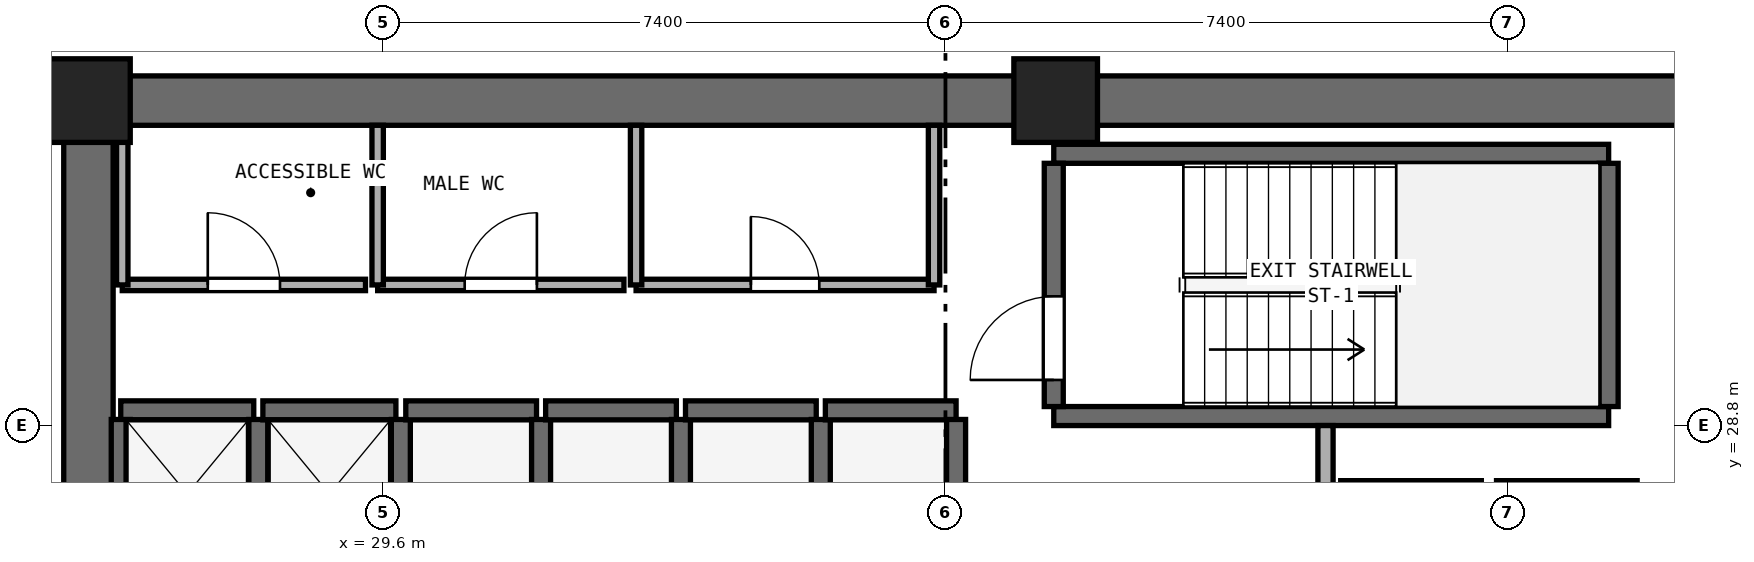
"""IFC4 building model, lengths in metres.
Left out: names, types, materials, properties, quantities, classifications, styles, units other than length and angle.
Written with IfcOpenShell. Run it as: python <this file> out.ifc"""

import sys

from ifc_helpers import new_model, si_unit, direction, frame, frame_2d, origin, origin_2d, place, context, subcontext, project, spatial, rectangle, extrude, element, fill, save


model = new_model("IFC4")
c1 = context("Model", 3, precision=1e-05, world=origin(), true_north=direction((0.0, 1.0)))
c2 = subcontext(c1, "Body", "Model", "MODEL_VIEW")
j1 = project(units=[si_unit("LENGTHUNIT", "METRE"), si_unit("PLANEANGLEUNIT", "RADIAN")], contexts=[c1])
p1 = place(None, origin())
s1 = spatial("IfcSite", under=j1, at=p1, CompositionType="ELEMENT")
p2 = place(p1, origin())
s2 = spatial("IfcBuilding", under=s1, at=p2, CompositionType="ELEMENT")
p3 = place(p2, frame((0.0, 0.0, 82.0)))
s3 = spatial("IfcBuildingStorey", under=s2, at=p3, CompositionType="ELEMENT", Elevation=82.0)
p4 = place(p3, frame((25.4, 33.075, 0.0), z_axis=(0.0, 0.0, 1.0), x_axis=(1.0, 0.0, 0.0)))
e1 = element("IfcWall", 1, at=p4, inside=s3, PredefinedType="SHEAR", context=c2, shape_type="SweptSolid", body=[
    extrude(rectangle(XDim=23.2, YDim=0.65, at=frame_2d((11.6, 0.0))), origin(), (0.0, 0.0, 1.0), 3.525),
])
p5 = place(p3, frame((25.725, 17.65, 0.0), z_axis=(0.0, 0.0, 1.0), x_axis=(0.0, 1.0, 0.0)))
e2 = element("IfcWall", 2, at=p5, inside=s3, PredefinedType="SHEAR", context=c2, shape_type="SweptSolid", body=[
    extrude(rectangle(XDim=15.1, YDim=0.65, at=frame_2d((7.55, 0.0))), origin(), (0.0, 0.0, 1.0), 3.525),
])
p6 = place(p5, frame((6.8, 0.0, 0.0)))
e3 = element("IfcOpeningElement", 3, at=p6, cuts=e2, PredefinedType="OPENING", context=c2, shape_type="SweptSolid", body=[
    extrude(rectangle(XDim=1.5, YDim=2.15, at=frame_2d((0.75, 1.075))), frame((0.0, 0.335, 0.0), z_axis=(0.0, -1.0, 0.0), x_axis=(1.0, 0.0, 0.0)), (0.0, 0.0, 1.0), 0.67),
])
for number, where, z_axis, x_axis in (
    (4, (38.45, 33.075, 0.0), (0.0, 0.0, 1.0), (1.0, 0.0, 0.0)),
    (5, (25.725, 33.075, 0.0), (0.0, 0.0, 1.0), (1.0, 0.0, 0.0)),
):
    element("IfcColumn", number, at=place(p3, frame(where, z_axis=z_axis, x_axis=x_axis)), inside=s3, PredefinedType="PILASTER", context=c2, shape_type="SweptSolid", body=[
        extrude(rectangle(XDim=1.1, YDim=1.1, at=origin_2d()), origin(), (0.0, 0.0, 1.0), 3.8),
    ])
for number, where, z_axis, x_axis in (
    (6, (38.425, 28.925, 0.0), (0.0, 0.0, 1.0), (1.0, 0.0, 0.0)),
    (7, (38.425, 32.375, 0.0), (0.0, 0.0, 1.0), (1.0, 0.0, 0.0)),
):
    element("IfcWall", number, at=place(p3, frame(where, z_axis=z_axis, x_axis=x_axis)), inside=s3, PredefinedType="SHEAR", context=c2, shape_type="SweptSolid", body=[
        extrude(rectangle(XDim=7.3, YDim=0.25, at=frame_2d((3.65, 0.0))), origin(), (0.0, 0.0, 1.0), 3.525),
    ])
p7 = place(p3, frame((38.425, 29.05, 0.0), z_axis=(0.0, 0.0, 1.0), x_axis=(0.0, 1.0, 0.0)))
e8 = element("IfcWall", 8, at=p7, inside=s3, PredefinedType="SHEAR", context=c2, shape_type="SweptSolid", body=[
    extrude(rectangle(XDim=3.2, YDim=0.25, at=frame_2d((1.6, 0.0))), origin(), (0.0, 0.0, 1.0), 3.525),
])
p8 = place(p7, frame((0.35, 0.0, 0.0)))
e9 = element("IfcOpeningElement", 9, at=p8, cuts=e8, PredefinedType="OPENING", context=c2, shape_type="SweptSolid", body=[
    extrude(rectangle(XDim=1.1, YDim=2.15, at=frame_2d((0.55, 1.075))), frame((0.0, 0.135, 0.0), z_axis=(0.0, -1.0, 0.0), x_axis=(1.0, 0.0, 0.0)), (0.0, 0.0, 1.0), 0.27),
])
p9 = place(p3, frame((45.725, 29.05, 0.0), z_axis=(0.0, 0.0, 1.0), x_axis=(0.0, 1.0, 0.0)))
e10 = element("IfcWall", 10, at=p9, inside=s3, PredefinedType="SHEAR", context=c2, shape_type="SweptSolid", body=[
    extrude(rectangle(XDim=3.2, YDim=0.25, at=frame_2d((1.6, 0.0))), origin(), (0.0, 0.0, 1.0), 3.525),
])
p10 = place(p3, frame((26.15, 29.0, 0.0), z_axis=(0.0, 0.0, 1.0), x_axis=(1.0, 0.0, 0.0)))
e11 = element("IfcWall", 11, at=p10, inside=s3, PredefinedType="SHEAR", context=c2, shape_type="SweptSolid", body=[
    extrude(rectangle(XDim=1.75, YDim=0.25, at=frame_2d((0.875, 0.0))), origin(), (0.0, 0.0, 1.0), 3.525),
])
for number, where, z_axis, x_axis in (
    (12, (26.15, 26.92, 0.0), (0.0, 0.0, 1.0), (0.0, 1.0, 0.0)),
    (13, (27.96, 26.92, 0.0), (0.0, 0.0, 1.0), (0.0, 1.0, 0.0)),
):
    element("IfcWall", number, at=place(p3, frame(where, z_axis=z_axis, x_axis=x_axis)), inside=s3, PredefinedType="SHEAR", context=c2, shape_type="SweptSolid", body=[
        extrude(rectangle(XDim=1.96, YDim=0.25, at=frame_2d((0.98, 0.0))), origin(), (0.0, 0.0, 1.0), 3.525),
    ])
p11 = place(p3, frame((28.02, 29.0, 0.0), z_axis=(0.0, 0.0, 1.0), x_axis=(1.0, 0.0, 0.0)))
e14 = element("IfcWall", 14, at=p11, inside=s3, PredefinedType="SHEAR", context=c2, shape_type="SweptSolid", body=[
    extrude(rectangle(XDim=1.75, YDim=0.25, at=frame_2d((0.875, 0.0))), origin(), (0.0, 0.0, 1.0), 3.525),
])
p12 = place(p3, frame((29.835, 26.92, 0.0), z_axis=(0.0, 0.0, 1.0), x_axis=(0.0, 1.0, 0.0)))
e15 = element("IfcWall", 15, at=p12, inside=s3, PredefinedType="SHEAR", context=c2, shape_type="SweptSolid", body=[
    extrude(rectangle(XDim=1.96, YDim=0.25, at=frame_2d((0.98, 0.0))), origin(), (0.0, 0.0, 1.0), 3.525),
])
p13 = place(p3, frame((29.9, 29.0, 0.0), z_axis=(0.0, 0.0, 1.0), x_axis=(1.0, 0.0, 0.0)))
e16 = element("IfcWall", 16, at=p13, inside=s3, PredefinedType="SHEAR", context=c2, shape_type="SweptSolid", body=[
    extrude(rectangle(XDim=1.72, YDim=0.25, at=frame_2d((0.86, 0.0))), origin(), (0.0, 0.0, 1.0), 3.525),
])
p14 = place(p3, frame((31.68, 26.92, 0.0), z_axis=(0.0, 0.0, 1.0), x_axis=(0.0, 1.0, 0.0)))
e17 = element("IfcWall", 17, at=p14, inside=s3, PredefinedType="SHEAR", context=c2, shape_type="SweptSolid", body=[
    extrude(rectangle(XDim=1.96, YDim=0.25, at=frame_2d((0.98, 0.0))), origin(), (0.0, 0.0, 1.0), 3.525),
])
p15 = place(p3, frame((31.74, 29.0, 0.0), z_axis=(0.0, 0.0, 1.0), x_axis=(1.0, 0.0, 0.0)))
e18 = element("IfcWall", 18, at=p15, inside=s3, PredefinedType="SHEAR", context=c2, shape_type="SweptSolid", body=[
    extrude(rectangle(XDim=1.72, YDim=0.25, at=frame_2d((0.86, 0.0))), origin(), (0.0, 0.0, 1.0), 3.525),
])
p16 = place(p3, frame((33.52, 26.92, 0.0), z_axis=(0.0, 0.0, 1.0), x_axis=(0.0, 1.0, 0.0)))
e19 = element("IfcWall", 19, at=p16, inside=s3, PredefinedType="SHEAR", context=c2, shape_type="SweptSolid", body=[
    extrude(rectangle(XDim=1.96, YDim=0.25, at=frame_2d((0.98, 0.0))), origin(), (0.0, 0.0, 1.0), 3.525),
])
p17 = place(p3, frame((33.58, 29.0, 0.0), z_axis=(0.0, 0.0, 1.0), x_axis=(1.0, 0.0, 0.0)))
e20 = element("IfcWall", 20, at=p17, inside=s3, PredefinedType="SHEAR", context=c2, shape_type="SweptSolid", body=[
    extrude(rectangle(XDim=1.72, YDim=0.25, at=frame_2d((0.86, 0.0))), origin(), (0.0, 0.0, 1.0), 3.525),
])
p18 = place(p3, frame((35.36, 26.92, 0.0), z_axis=(0.0, 0.0, 1.0), x_axis=(0.0, 1.0, 0.0)))
e21 = element("IfcWall", 21, at=p18, inside=s3, PredefinedType="SHEAR", context=c2, shape_type="SweptSolid", body=[
    extrude(rectangle(XDim=1.96, YDim=0.25, at=frame_2d((0.98, 0.0))), origin(), (0.0, 0.0, 1.0), 3.525),
])
p19 = place(p3, frame((35.42, 29.0, 0.0), z_axis=(0.0, 0.0, 1.0), x_axis=(1.0, 0.0, 0.0)))
e22 = element("IfcWall", 22, at=p19, inside=s3, PredefinedType="SHEAR", context=c2, shape_type="SweptSolid", body=[
    extrude(rectangle(XDim=1.72, YDim=0.25, at=frame_2d((0.86, 0.0))), origin(), (0.0, 0.0, 1.0), 3.525),
])
p20 = place(p3, frame((37.14, 26.92, 0.0), z_axis=(0.0, 0.0, 1.0), x_axis=(0.0, 1.0, 0.0)))
e23 = element("IfcWall", 23, at=p20, inside=s3, PredefinedType="SHEAR", context=c2, shape_type="SweptSolid", body=[
    extrude(rectangle(XDim=1.96, YDim=0.25, at=frame_2d((0.98, 0.0))), origin(), (0.0, 0.0, 1.0), 3.525),
])
for number, where, z_axis, x_axis in (
    (24, (42.2, 27.95, 0.0), (0.0, 0.0, 1.0), (1.0, 0.0, 0.0)),
    (25, (44.25, 27.95, 0.0), (0.0, 0.0, 1.0), (1.0, 0.0, 0.0)),
):
    element("IfcWall", number, at=place(p3, frame(where, z_axis=z_axis, x_axis=x_axis)), inside=s3, PredefinedType="SHEAR", context=c2, shape_type="SweptSolid", body=[
        extrude(rectangle(XDim=1.85, YDim=0.25, at=frame_2d((0.925, 0.0))), origin(), (0.0, 0.0, 1.0), 3.525),
    ])
p21 = place(p3, frame((42.0, 22.75, 0.0), z_axis=(0.0, 0.0, 1.0), x_axis=(0.0, 1.0, 0.0)))
e26 = element("IfcWall", 26, at=p21, inside=s3, PredefinedType="SOLIDWALL", context=c2, shape_type="SweptSolid", body=[
    extrude(rectangle(XDim=6.05, YDim=0.2, at=frame_2d((3.025, 0.0))), origin(), (0.0, 0.0, 1.0), 3.525),
])
p22 = place(p21, frame((0.65, 0.0, 0.0)))
e27 = element("IfcOpeningElement", 27, at=p22, cuts=e26, PredefinedType="OPENING", context=c2, shape_type="SweptSolid", body=[
    extrude(rectangle(XDim=1.2, YDim=2.15, at=frame_2d((0.6, 1.075))), frame((0.0, 0.11, 0.0), z_axis=(0.0, -1.0, 0.0), x_axis=(1.0, 0.0, 0.0)), (0.0, 0.0, 1.0), 0.22),
])
p23 = place(p3, frame((26.17, 30.65, 0.0), z_axis=(0.0, 0.0, 1.0), x_axis=(1.0, 0.0, 0.0)))
e28 = element("IfcWall", 28, at=p23, inside=s3, PredefinedType="PARTITIONING", context=c2, shape_type="SweptSolid", body=[
    extrude(rectangle(XDim=3.2, YDim=0.15, at=frame_2d((1.6, 0.0))), origin(), (0.0, 0.0, 1.0), 3.525),
])
p24 = place(p23, frame((1.125, 0.0, 0.0)))
e29 = element("IfcOpeningElement", 29, at=p24, cuts=e28, PredefinedType="OPENING", context=c2, shape_type="SweptSolid", body=[
    extrude(rectangle(XDim=0.95, YDim=2.1, at=frame_2d((0.475, 1.05))), frame((0.0, 0.085, 0.0), z_axis=(0.0, -1.0, 0.0), x_axis=(1.0, 0.0, 0.0)), (0.0, 0.0, 1.0), 0.17),
])
p25 = place(p3, frame((26.17, 30.65, 0.0), z_axis=(0.0, 0.0, 1.0), x_axis=(0.0, 1.0, 0.0)))
e30 = element("IfcWall", 30, at=p25, inside=s3, PredefinedType="PARTITIONING", context=c2, shape_type="SweptSolid", body=[
    extrude(rectangle(XDim=2.1, YDim=0.15, at=frame_2d((1.05, 0.0))), origin(), (0.0, 0.0, 1.0), 3.525),
])
p26 = place(p3, frame((29.53, 30.65, 0.0), z_axis=(0.0, 0.0, 1.0), x_axis=(1.0, 0.0, 0.0)))
e31 = element("IfcWall", 31, at=p26, inside=s3, PredefinedType="PARTITIONING", context=c2, shape_type="SweptSolid", body=[
    extrude(rectangle(XDim=3.24, YDim=0.15, at=frame_2d((1.62, 0.0))), origin(), (0.0, 0.0, 1.0), 3.525),
])
p27 = place(p26, frame((1.145, 0.0, 0.0)))
e32 = element("IfcOpeningElement", 32, at=p27, cuts=e31, PredefinedType="OPENING", context=c2, shape_type="SweptSolid", body=[
    extrude(rectangle(XDim=0.95, YDim=2.1, at=frame_2d((0.475, 1.05))), frame((0.0, 0.085, 0.0), z_axis=(0.0, -1.0, 0.0), x_axis=(1.0, 0.0, 0.0)), (0.0, 0.0, 1.0), 0.17),
])
p28 = place(p3, frame((29.53, 30.65, 0.0), z_axis=(0.0, 0.0, 1.0), x_axis=(0.0, 1.0, 0.0)))
e33 = element("IfcWall", 33, at=p28, inside=s3, PredefinedType="PARTITIONING", context=c2, shape_type="SweptSolid", body=[
    extrude(rectangle(XDim=2.1, YDim=0.15, at=frame_2d((1.05, 0.0))), origin(), (0.0, 0.0, 1.0), 3.525),
])
p29 = place(p3, frame((32.93, 30.65, 0.0), z_axis=(0.0, 0.0, 1.0), x_axis=(1.0, 0.0, 0.0)))
e34 = element("IfcWall", 34, at=p29, inside=s3, PredefinedType="PARTITIONING", context=c2, shape_type="SweptSolid", body=[
    extrude(rectangle(XDim=3.92, YDim=0.15, at=frame_2d((1.96, 0.0))), origin(), (0.0, 0.0, 1.0), 3.525),
])
p30 = place(p29, frame((1.51, 0.0, 0.0)))
e35 = element("IfcOpeningElement", 35, at=p30, cuts=e34, PredefinedType="OPENING", context=c2, shape_type="SweptSolid", body=[
    extrude(rectangle(XDim=0.9, YDim=2.1, at=frame_2d((0.45, 1.05))), frame((0.0, 0.085, 0.0), z_axis=(0.0, -1.0, 0.0), x_axis=(1.0, 0.0, 0.0)), (0.0, 0.0, 1.0), 0.17),
])
for number, where, z_axis, x_axis in (
    (36, (32.93, 30.65, 0.0), (0.0, 0.0, 1.0), (0.0, 1.0, 0.0)),
    (37, (36.85, 30.65, 0.0), (0.0, 0.0, 1.0), (0.0, 1.0, 0.0)),
):
    element("IfcWall", number, at=place(p3, frame(where, z_axis=z_axis, x_axis=x_axis)), inside=s3, PredefinedType="PARTITIONING", context=c2, shape_type="SweptSolid", body=[
        extrude(rectangle(XDim=2.1, YDim=0.15, at=frame_2d((1.05, 0.0))), origin(), (0.0, 0.0, 1.0), 3.525),
    ])
p31 = place(p8, origin())
e38 = element("IfcDoor", 38, at=p31, inside=s3, OperationType="SINGLE_SWING_LEFT", PredefinedType="DOOR", context=c2, shape_type="SweptSolid", body=[
    extrude(rectangle(XDim=1.1, YDim=2.15, at=frame_2d((0.55, 1.075))), frame((0.0, 0.025, 0.0), z_axis=(0.0, -1.0, 0.0), x_axis=(1.0, 0.0, 0.0)), (0.0, 0.0, 1.0), 0.05),
])
fill(e9, e38)
p32 = place(p24, origin())
e39 = element("IfcDoor", 39, at=p32, inside=s3, OperationType="SINGLE_SWING_LEFT", PredefinedType="DOOR", context=c2, shape_type="SweptSolid", body=[
    extrude(rectangle(XDim=0.95, YDim=2.1, at=frame_2d((0.475, 1.05))), frame((0.0, 0.025, 0.0), z_axis=(0.0, -1.0, 0.0), x_axis=(1.0, 0.0, 0.0)), (0.0, 0.0, 1.0), 0.05),
])
fill(e29, e39)
p33 = place(p27, origin())
e40 = element("IfcDoor", 40, at=p33, inside=s3, OperationType="SINGLE_SWING_RIGHT", PredefinedType="DOOR", context=c2, shape_type="SweptSolid", body=[
    extrude(rectangle(XDim=0.95, YDim=2.1, at=frame_2d((0.475, 1.05))), frame((0.0, 0.025, 0.0), z_axis=(0.0, -1.0, 0.0), x_axis=(1.0, 0.0, 0.0)), (0.0, 0.0, 1.0), 0.05),
])
fill(e32, e40)
p34 = place(p30, origin())
e41 = element("IfcDoor", 41, at=p34, inside=s3, OperationType="SINGLE_SWING_LEFT", PredefinedType="DOOR", context=c2, shape_type="SweptSolid", body=[
    extrude(rectangle(XDim=0.9, YDim=2.1, at=frame_2d((0.45, 1.05))), frame((0.0, 0.025, 0.0), z_axis=(0.0, -1.0, 0.0), x_axis=(1.0, 0.0, 0.0)), (0.0, 0.0, 1.0), 0.05),
])
fill(e35, e41)
save(model, sys.argv[1])
